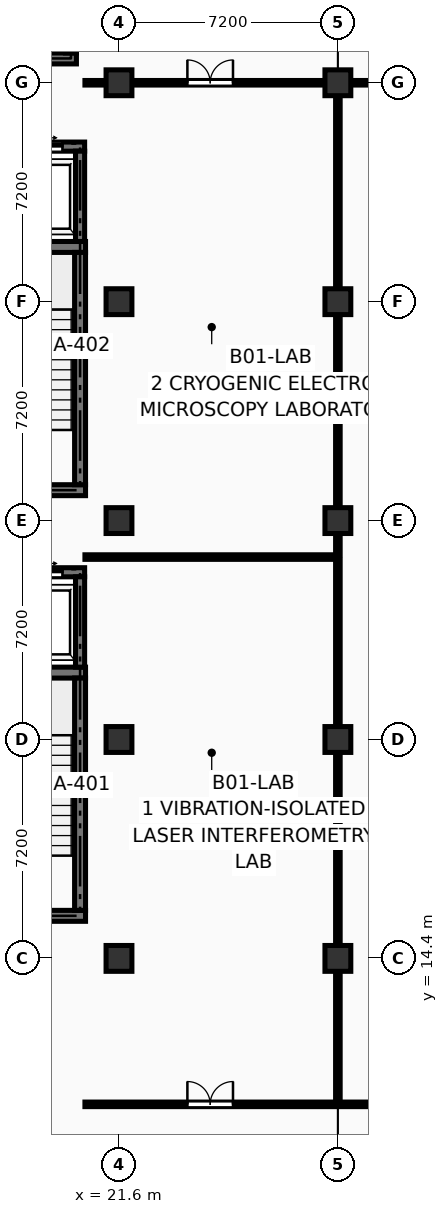
"""IFC4 building model, lengths in metres.
Left out: names, types, materials, properties, quantities, classifications, styles, units other than length and angle.
Written with IfcOpenShell. Run it as: python <this file> out.ifc"""

import sys

from ifc_helpers import new_model, si_unit, direction, frame, frame_2d, origin, origin_2d, place, context, subcontext, project, spatial, rectangle, extrude, element, fill, save


model = new_model("IFC4")
c1 = context("Model", 3, precision=1e-05, world=origin(), true_north=direction((0.0, 1.0)))
c2 = subcontext(c1, "Body", "Model", "MODEL_VIEW")
j1 = project(units=[si_unit("LENGTHUNIT", "METRE"), si_unit("PLANEANGLEUNIT", "RADIAN")], contexts=[c1])
p1 = place(None, origin())
s1 = spatial("IfcSite", under=j1, at=p1, CompositionType="ELEMENT")
p2 = place(p1, origin())
s2 = spatial("IfcBuilding", under=s1, at=p2, CompositionType="ELEMENT")
p3 = place(p2, frame((0.0, 0.0, -4.5)))
s3 = spatial("IfcBuildingStorey", under=s2, at=p3, CompositionType="ELEMENT", Elevation=-4.5)
for number, where, z_axis, x_axis in (
    (1, (21.6, 14.4, 0.0), (0.0, 0.0, 1.0), (1.0, 0.0, 0.0)),
    (2, (21.6, 21.6, 0.0), (0.0, 0.0, 1.0), (1.0, 0.0, 0.0)),
    (3, (21.6, 28.8, 0.0), (0.0, 0.0, 1.0), (1.0, 0.0, 0.0)),
    (4, (21.6, 36.0, 0.0), (0.0, 0.0, 1.0), (1.0, 0.0, 0.0)),
    (5, (21.6, 43.2, 0.0), (0.0, 0.0, 1.0), (1.0, 0.0, 0.0)),
):
    element("IfcColumn", number, at=place(p3, frame(where, z_axis=z_axis, x_axis=x_axis)), inside=s3, PredefinedType="COLUMN", context=c2, shape_type="SweptSolid", body=[
        extrude(rectangle(XDim=0.85, YDim=0.85, at=origin_2d()), origin(), (0.0, 0.0, 1.0), 4.5),
    ])
for number, where, z_axis, x_axis in (
    (6, (28.8, 14.4, -0.3), (0.0, 0.0, 1.0), (1.0, 0.0, 0.0)),
    (7, (28.8, 21.6, -0.3), (0.0, 0.0, 1.0), (1.0, 0.0, 0.0)),
    (8, (28.8, 28.8, -0.3), (0.0, 0.0, 1.0), (1.0, 0.0, 0.0)),
    (9, (28.8, 36.0, -0.3), (0.0, 0.0, 1.0), (1.0, 0.0, 0.0)),
    (10, (28.8, 43.2, -0.3), (0.0, 0.0, 1.0), (1.0, 0.0, 0.0)),
):
    element("IfcColumn", number, at=place(p3, frame(where, z_axis=z_axis, x_axis=x_axis)), inside=s3, PredefinedType="COLUMN", context=c2, shape_type="SweptSolid", body=[
        extrude(rectangle(XDim=0.85, YDim=0.85, at=origin_2d()), origin(), (0.0, 0.0, 1.0), 4.8),
    ])
for number, where, z_axis, x_axis in (
    (11, (15.62, 15.8, -0.3), (0.0, 0.0, 1.0), (1.0, 0.0, 0.0)),
    (12, (15.62, 23.8, -0.3), (0.0, 0.0, 1.0), (1.0, 0.0, 0.0)),
):
    element("IfcWall", number, at=place(p3, frame(where, z_axis=z_axis, x_axis=x_axis)), inside=s3, PredefinedType="SHEAR", context=c2, shape_type="SweptSolid", body=[
        extrude(rectangle(XDim=4.88, YDim=0.36, at=frame_2d((2.44, 0.0))), origin(), (0.0, 0.0, 1.0), 4.54),
    ])
p4 = place(p3, frame((20.32, 15.98, -0.3), z_axis=(0.0, 0.0, 1.0), x_axis=(0.0, 1.0, 0.0)))
e13 = element("IfcWall", 13, at=p4, inside=s3, PredefinedType="SHEAR", context=c2, shape_type="SweptSolid", body=[
    extrude(rectangle(XDim=7.64, YDim=0.36, at=frame_2d((3.82, 0.0))), origin(), (0.0, 0.0, 1.0), 4.54),
])
for number, where, z_axis, x_axis in (
    (14, (15.62, 29.8, -0.3), (0.0, 0.0, 1.0), (1.0, 0.0, 0.0)),
    (15, (15.62, 37.8, -0.3), (0.0, 0.0, 1.0), (1.0, 0.0, 0.0)),
):
    element("IfcWall", number, at=place(p3, frame(where, z_axis=z_axis, x_axis=x_axis)), inside=s3, PredefinedType="SHEAR", context=c2, shape_type="SweptSolid", body=[
        extrude(rectangle(XDim=4.88, YDim=0.36, at=frame_2d((2.44, 0.0))), origin(), (0.0, 0.0, 1.0), 4.54),
    ])
p5 = place(p3, frame((20.32, 29.98, -0.3), z_axis=(0.0, 0.0, 1.0), x_axis=(0.0, 1.0, 0.0)))
e16 = element("IfcWall", 16, at=p5, inside=s3, PredefinedType="SHEAR", context=c2, shape_type="SweptSolid", body=[
    extrude(rectangle(XDim=7.64, YDim=0.36, at=frame_2d((3.82, 0.0))), origin(), (0.0, 0.0, 1.0), 4.54),
])
p6 = place(p3, frame((15.72, 44.0, -0.3), z_axis=(0.0, 0.0, 1.0), x_axis=(1.0, 0.0, 0.0)))
e17 = element("IfcWall", 17, at=p6, inside=s3, PredefinedType="SHEAR", context=c2, shape_type="SweptSolid", body=[
    extrude(rectangle(XDim=4.48, YDim=0.36, at=frame_2d((2.24, 0.0))), origin(), (0.0, 0.0, 1.0), 4.54),
])
p7 = place(p3, frame((20.02, 44.18, -0.3), z_axis=(0.0, 0.0, 1.0), x_axis=(0.0, 1.0, 0.0)))
e18 = element("IfcWall", 18, at=p7, inside=s3, PredefinedType="SHEAR", context=c2, shape_type="SweptSolid", body=[
    extrude(rectangle(XDim=7.24, YDim=0.36, at=frame_2d((3.62, 0.0))), origin(), (0.0, 0.0, 1.0), 4.54),
])
p8 = place(p3, frame((17.91, 27.1, -1.6), z_axis=(0.0, 0.0, 1.0), x_axis=(1.0, 0.0, 0.0)))
e19 = element("IfcWall", 19, at=p8, inside=s3, PredefinedType="SHEAR", context=c2, shape_type="SweptSolid", body=[
    extrude(rectangle(XDim=2.56, YDim=0.3, at=frame_2d((1.28, 0.0))), origin(), (0.0, 0.0, 1.0), 5.84),
])
p9 = place(p8, frame((0.73, 0.0, 1.6)))
e20 = element("IfcOpeningElement", 20, at=p9, cuts=e19, PredefinedType="OPENING", context=c2, shape_type="SweptSolid", body=[
    extrude(rectangle(XDim=1.1, YDim=2.2, at=frame_2d((0.55, 1.1))), frame((0.0, 0.162, 0.0), z_axis=(0.0, -1.0, 0.0), x_axis=(1.0, 0.0, 0.0)), (0.0, 0.0, 1.0), 0.324),
])
p10 = place(p3, frame((20.32, 23.98, -1.6), z_axis=(0.0, 0.0, 1.0), x_axis=(0.0, 1.0, 0.0)))
e21 = element("IfcWall", 21, at=p10, inside=s3, PredefinedType="SHEAR", context=c2, shape_type="SweptSolid", body=[
    extrude(rectangle(XDim=2.97, YDim=0.3, at=frame_2d((1.485, 0.0))), origin(), (0.0, 0.0, 1.0), 5.84),
])
p11 = place(p3, frame((17.91, 41.1, -1.6), z_axis=(0.0, 0.0, 1.0), x_axis=(1.0, 0.0, 0.0)))
e22 = element("IfcWall", 22, at=p11, inside=s3, PredefinedType="SHEAR", context=c2, shape_type="SweptSolid", body=[
    extrude(rectangle(XDim=2.56, YDim=0.3, at=frame_2d((1.28, 0.0))), origin(), (0.0, 0.0, 1.0), 5.84),
])
p12 = place(p11, frame((0.73, 0.0, 1.6)))
e23 = element("IfcOpeningElement", 23, at=p12, cuts=e22, PredefinedType="OPENING", context=c2, shape_type="SweptSolid", body=[
    extrude(rectangle(XDim=1.1, YDim=2.2, at=frame_2d((0.55, 1.1))), frame((0.0, 0.162, 0.0), z_axis=(0.0, -1.0, 0.0), x_axis=(1.0, 0.0, 0.0)), (0.0, 0.0, 1.0), 0.324),
])
p13 = place(p3, frame((20.32, 37.98, -1.6), z_axis=(0.0, 0.0, 1.0), x_axis=(0.0, 1.0, 0.0)))
e24 = element("IfcWall", 24, at=p13, inside=s3, PredefinedType="SHEAR", context=c2, shape_type="SweptSolid", body=[
    extrude(rectangle(XDim=2.97, YDim=0.3, at=frame_2d((1.485, 0.0))), origin(), (0.0, 0.0, 1.0), 5.84),
])
p14 = place(p3, frame((20.48, 9.6, 0.0), z_axis=(0.0, 0.0, 1.0), x_axis=(1.0, 0.0, 0.0)))
e25 = element("IfcWall", 25, at=p14, inside=s3, PredefinedType="PARTITIONING", context=c2, shape_type="SweptSolid", body=[
    extrude(rectangle(XDim=8.24, YDim=0.15, at=frame_2d((4.12, 0.0))), origin(), (0.0, 0.0, 1.0), 4.225),
])
p15 = place(p14, frame((3.37, 0.0, 0.0)))
e26 = element("IfcOpeningElement", 26, at=p15, cuts=e25, PredefinedType="OPENING", context=c2, shape_type="SweptSolid", body=[
    extrude(rectangle(XDim=1.5, YDim=2.2, at=frame_2d((0.75, 1.1))), frame((0.0, 0.087, 0.0), z_axis=(0.0, -1.0, 0.0), x_axis=(1.0, 0.0, 0.0)), (0.0, 0.0, 1.0), 0.174),
])
p16 = place(p3, frame((28.8, 9.68, 0.0), z_axis=(0.0, 0.0, 1.0), x_axis=(0.0, 1.0, 0.0)))
e27 = element("IfcWall", 27, at=p16, inside=s3, PredefinedType="PARTITIONING", context=c2, shape_type="SweptSolid", body=[
    extrude(rectangle(XDim=17.84, YDim=0.15, at=frame_2d((8.92, 0.0))), origin(), (0.0, 0.0, 1.0), 3.375),
])
p17 = place(p3, frame((20.48, 27.6, 0.0), z_axis=(0.0, 0.0, 1.0), x_axis=(1.0, 0.0, 0.0)))
e28 = element("IfcWall", 28, at=p17, inside=s3, PredefinedType="PARTITIONING", context=c2, shape_type="SweptSolid", body=[
    extrude(rectangle(XDim=8.24, YDim=0.15, at=frame_2d((4.12, 0.0))), origin(), (0.0, 0.0, 1.0), 4.225),
])
p18 = place(p3, frame((28.8, 27.68, 0.0), z_axis=(0.0, 0.0, 1.0), x_axis=(0.0, 1.0, 0.0)))
e29 = element("IfcWall", 29, at=p18, inside=s3, PredefinedType="PARTITIONING", context=c2, shape_type="SweptSolid", body=[
    extrude(rectangle(XDim=15.44, YDim=0.15, at=frame_2d((7.72, 0.0))), origin(), (0.0, 0.0, 1.0), 3.375),
])
p19 = place(p3, frame((20.48, 43.2, 0.0), z_axis=(0.0, 0.0, 1.0), x_axis=(1.0, 0.0, 0.0)))
e30 = element("IfcWall", 30, at=p19, inside=s3, PredefinedType="PARTITIONING", context=c2, shape_type="SweptSolid", body=[
    extrude(rectangle(XDim=8.24, YDim=0.15, at=frame_2d((4.12, 0.0))), origin(), (0.0, 0.0, 1.0), 3.375),
])
p20 = place(p19, frame((3.37, 0.0, 0.0)))
e31 = element("IfcOpeningElement", 31, at=p20, cuts=e30, PredefinedType="OPENING", context=c2, shape_type="SweptSolid", body=[
    extrude(rectangle(XDim=1.5, YDim=2.2, at=frame_2d((0.75, 1.1))), frame((0.0, 0.087, 0.0), z_axis=(0.0, -1.0, 0.0), x_axis=(1.0, 0.0, 0.0)), (0.0, 0.0, 1.0), 0.174),
])
p21 = place(p3, frame((28.88, 9.6, 0.0), z_axis=(0.0, 0.0, 1.0), x_axis=(1.0, 0.0, 0.0)))
e32 = element("IfcWall", 32, at=p21, inside=s3, PredefinedType="PARTITIONING", context=c2, shape_type="SweptSolid", body=[
    extrude(rectangle(XDim=17.84, YDim=0.15, at=frame_2d((8.92, 0.0))), origin(), (0.0, 0.0, 1.0), 4.225),
])
p22 = place(p21, frame((8.17, 0.0, 0.0)))
e33 = element("IfcOpeningElement", 33, at=p22, cuts=e32, PredefinedType="OPENING", context=c2, shape_type="SweptSolid", body=[
    extrude(rectangle(XDim=1.5, YDim=2.2, at=frame_2d((0.75, 1.1))), frame((0.0, 0.087, 0.0), z_axis=(0.0, -1.0, 0.0), x_axis=(1.0, 0.0, 0.0)), (0.0, 0.0, 1.0), 0.174),
])
p23 = place(p3, frame((28.88, 43.2, 0.0), z_axis=(0.0, 0.0, 1.0), x_axis=(1.0, 0.0, 0.0)))
e34 = element("IfcWall", 34, at=p23, inside=s3, PredefinedType="PARTITIONING", context=c2, shape_type="SweptSolid", body=[
    extrude(rectangle(XDim=17.84, YDim=0.15, at=frame_2d((8.92, 0.0))), origin(), (0.0, 0.0, 1.0), 3.375),
])
p24 = place(p9, origin())
e35 = element("IfcDoor", 35, at=p24, inside=s3, OperationType="DOUBLE_DOOR_SLIDING", PredefinedType="DOOR", context=c2, shape_type="SweptSolid", body=[
    extrude(rectangle(XDim=1.1, YDim=2.2, at=frame_2d((0.55, 1.1))), frame((0.0, 0.025, 0.0), z_axis=(0.0, -1.0, 0.0), x_axis=(1.0, 0.0, 0.0)), (0.0, 0.0, 1.0), 0.05),
])
fill(e20, e35)
p25 = place(p12, origin())
e36 = element("IfcDoor", 36, at=p25, inside=s3, OperationType="DOUBLE_DOOR_SLIDING", PredefinedType="DOOR", context=c2, shape_type="SweptSolid", body=[
    extrude(rectangle(XDim=1.1, YDim=2.2, at=frame_2d((0.55, 1.1))), frame((0.0, 0.025, 0.0), z_axis=(0.0, -1.0, 0.0), x_axis=(1.0, 0.0, 0.0)), (0.0, 0.0, 1.0), 0.05),
])
fill(e23, e36)
p26 = place(p15, origin())
e37 = element("IfcDoor", 37, at=p26, inside=s3, OperationType="DOUBLE_DOOR_SINGLE_SWING", PredefinedType="DOOR", context=c2, shape_type="SweptSolid", body=[
    extrude(rectangle(XDim=1.5, YDim=2.2, at=frame_2d((0.75, 1.1))), frame((0.0, 0.025, 0.0), z_axis=(0.0, -1.0, 0.0), x_axis=(1.0, 0.0, 0.0)), (0.0, 0.0, 1.0), 0.05),
])
fill(e26, e37)
p27 = place(p20, origin())
e38 = element("IfcDoor", 38, at=p27, inside=s3, OperationType="DOUBLE_DOOR_SINGLE_SWING", PredefinedType="DOOR", context=c2, shape_type="SweptSolid", body=[
    extrude(rectangle(XDim=1.5, YDim=2.2, at=frame_2d((0.75, 1.1))), frame((0.0, 0.025, 0.0), z_axis=(0.0, -1.0, 0.0), x_axis=(1.0, 0.0, 0.0)), (0.0, 0.0, 1.0), 0.05),
])
fill(e31, e38)
save(model, sys.argv[1])
